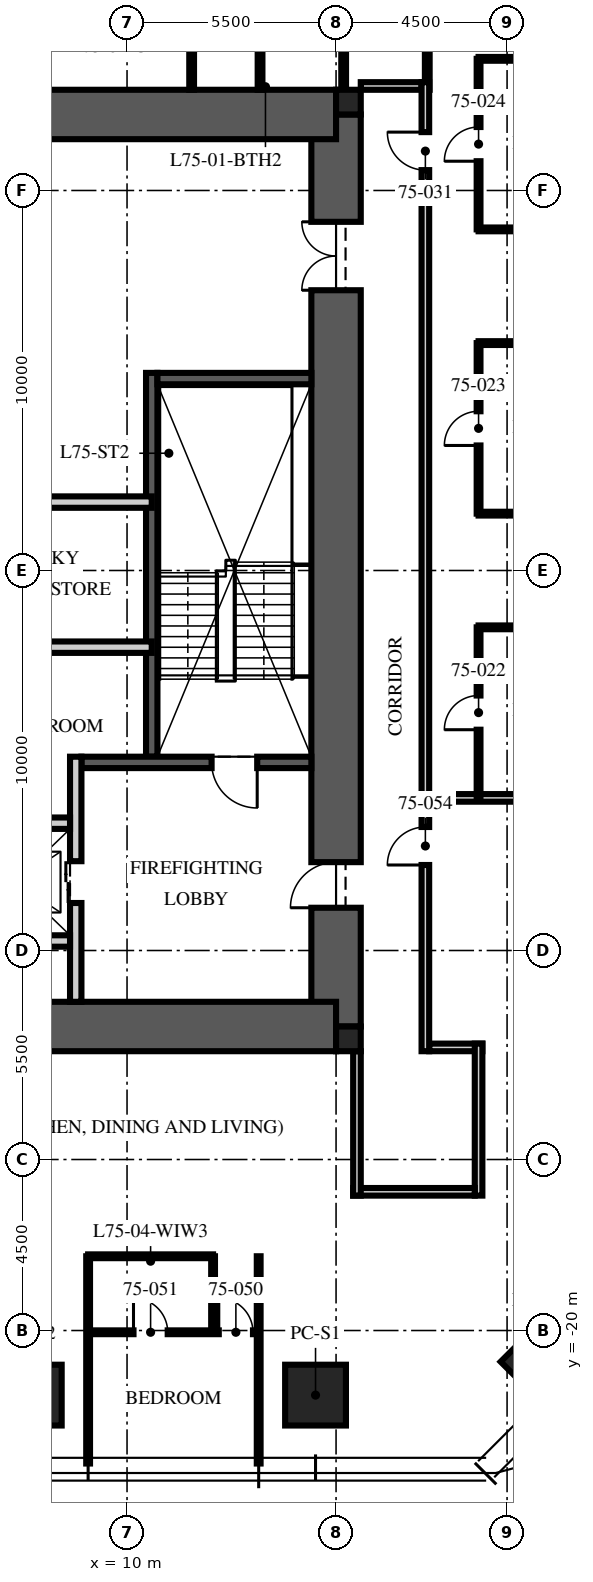
"""IFC4 building model, lengths in metres.
Left out: names, types, materials, properties, quantities, classifications, styles, units other than length and angle.
Written with IfcOpenShell. Run it as: python <this file> out.ifc"""

import sys

from ifc_helpers import new_model, si_unit, direction, frame, frame_2d, origin, origin_2d, place, context, subcontext, project, spatial, rectangle, extrude, element, fill, save


model = new_model("IFC4")
c1 = context("Model", 3, precision=1e-05, world=origin(), true_north=direction((0.0, 1.0)))
c2 = subcontext(c1, "Body", "Model", "MODEL_VIEW")
j1 = project(units=[si_unit("LENGTHUNIT", "METRE"), si_unit("PLANEANGLEUNIT", "RADIAN")], contexts=[c1])
p1 = place(None, origin())
s1 = spatial("IfcSite", under=j1, at=p1, CompositionType="ELEMENT")
p2 = place(p1, origin())
s2 = spatial("IfcBuilding", under=s1, at=p2, CompositionType="ELEMENT")
p3 = place(p2, frame((0.0, 0.0, 300.75)))
s3 = spatial("IfcBuildingStorey", under=s2, at=p3, CompositionType="ELEMENT", Elevation=300.75)
p4 = place(p3, frame((15.5, -12.0, -0.25), z_axis=(0.0, 0.0, 1.0), x_axis=(0.0, 1.0, 0.0)))
e1 = element("IfcWall", 1, at=p4, inside=s3, PredefinedType="SHEAR", context=c2, shape_type="SweptSolid", body=[
    extrude(rectangle(XDim=24.0, YDim=1.3, at=frame_2d((12.0, 0.0))), origin(), (0.0, 0.0, 1.0), 3.75),
])
p5 = place(p4, frame((3.125, 0.0, 0.25)))
e2 = element("IfcOpeningElement", 2, at=p5, cuts=e1, PredefinedType="OPENING", context=c2, shape_type="SweptSolid", body=[
    extrude(rectangle(XDim=1.2, YDim=2.1, at=frame_2d((0.6, 1.05))), frame((0.0, 0.66, 0.0), z_axis=(0.0, -1.0, 0.0), x_axis=(1.0, 0.0, 0.0)), (0.0, 0.0, 1.0), 1.32),
])
p6 = place(p4, frame((19.375, 0.0, 0.25)))
e3 = element("IfcOpeningElement", 3, at=p6, cuts=e1, PredefinedType="OPENING", context=c2, shape_type="SweptSolid", body=[
    extrude(rectangle(XDim=1.8, YDim=2.1, at=frame_2d((0.9, 1.05))), frame((0.0, 0.66, 0.0), z_axis=(0.0, -1.0, 0.0), x_axis=(1.0, 0.0, 0.0)), (0.0, 0.0, 1.0), 1.32),
])
for number, where, z_axis, x_axis in (
    (4, (-15.5, 12.0, -0.25), (0.0, 0.0, 1.0), (1.0, 0.0, 0.0)),
    (5, (-15.5, -12.0, -0.25), (0.0, 0.0, 1.0), (1.0, 0.0, 0.0)),
):
    element("IfcWall", number, at=place(p3, frame(where, z_axis=z_axis, x_axis=x_axis)), inside=s3, PredefinedType="SHEAR", context=c2, shape_type="SweptSolid", body=[
        extrude(rectangle(XDim=31.0, YDim=1.3, at=frame_2d((15.5, 0.0))), origin(), (0.0, 0.0, 1.0), 3.75),
    ])
for number, where, z_axis, x_axis in (
    (6, (15.825, 12.325, -0.25), (0.0, 0.0, 1.0), (1.0, 0.0, 0.0)),
    (7, (15.825, -12.325, -0.25), (0.0, 0.0, 1.0), (1.0, 0.0, 0.0)),
):
    element("IfcColumn", number, at=place(p3, frame(where, z_axis=z_axis, x_axis=x_axis)), inside=s3, PredefinedType="COLUMN", context=c2, shape_type="SweptSolid", body=[
        extrude(rectangle(XDim=0.65, YDim=0.65, at=origin_2d()), origin(), (0.0, 0.0, 1.0), 3.75),
    ])
for number, where, z_axis, x_axis in (
    (8, (14.96, -21.7, 0.0), (0.0, 0.0, 1.0), (1.0, 0.0, 0.0)),
    (9, (7.48, -21.7, 0.0), (0.0, 0.0, 1.0), (1.0, 0.0, 0.0)),
):
    element("IfcColumn", number, at=place(p3, frame(where, z_axis=z_axis, x_axis=x_axis)), inside=s3, PredefinedType="COLUMN", context=c2, shape_type="SweptSolid", body=[
        extrude(rectangle(XDim=1.6, YDim=1.6, at=origin_2d()), origin(), (0.0, 0.0, 1.0), 3.75),
    ])
p7 = place(p3, frame((20.821, -20.821, 0.0), z_axis=(0.0, 0.0, 1.0), x_axis=(0.707106781187, 0.707106781187, 0.0)))
e10 = element("IfcColumn", 10, at=p7, inside=s3, PredefinedType="COLUMN", context=c2, shape_type="SweptSolid", body=[
    extrude(rectangle(XDim=1.4, YDim=1.4, at=origin_2d()), origin(), (0.0, 0.0, 1.0), 3.75),
])
p8 = place(p3, frame((10.65, -4.9, 0.0), z_axis=(0.0, 0.0, 1.0), x_axis=(0.0, 1.0, 0.0)))
e11 = element("IfcWall", 11, at=p8, inside=s3, PredefinedType="SOLIDWALL", context=c2, shape_type="SweptSolid", body=[
    extrude(rectangle(XDim=10.1, YDim=0.3, at=frame_2d((5.05, 0.0))), origin(), (0.0, 0.0, 1.0), 3.5),
])
p9 = place(p3, frame((14.85, -5.05, 0.0), z_axis=(0.0, 0.0, 1.0), x_axis=(-1.0, 0.0, 0.0)))
e12 = element("IfcWall", 12, at=p9, inside=s3, PredefinedType="SOLIDWALL", context=c2, shape_type="SweptSolid", body=[
    extrude(rectangle(XDim=6.05, YDim=0.3, at=frame_2d((3.025, 0.0))), origin(), (0.0, 0.0, 1.0), 3.5),
])
p10 = place(p9, frame((1.425, 0.0, 0.0)))
e13 = element("IfcOpeningElement", 13, at=p10, cuts=e12, PredefinedType="OPENING", context=c2, shape_type="SweptSolid", body=[
    extrude(rectangle(XDim=1.2, YDim=2.1, at=frame_2d((0.6, 1.05))), frame((0.0, 0.16, 0.0), z_axis=(0.0, -1.0, 0.0), x_axis=(1.0, 0.0, 0.0)), (0.0, 0.0, 1.0), 0.32),
])
p11 = place(p3, frame((14.85, 5.05, 0.0), z_axis=(0.0, 0.0, 1.0), x_axis=(-1.0, 0.0, 0.0)))
e14 = element("IfcWall", 14, at=p11, inside=s3, PredefinedType="SOLIDWALL", context=c2, shape_type="SweptSolid", body=[
    extrude(rectangle(XDim=4.05, YDim=0.3, at=frame_2d((2.025, 0.0))), origin(), (0.0, 0.0, 1.0), 3.5),
])
p12 = place(p3, frame((8.65, -11.35, 0.0), z_axis=(0.0, 0.0, 1.0), x_axis=(0.0, 1.0, 0.0)))
e15 = element("IfcWall", 15, at=p12, inside=s3, PredefinedType="PARTITIONING", context=c2, shape_type="SweptSolid", body=[
    extrude(rectangle(XDim=6.45, YDim=0.3, at=frame_2d((3.225, 0.0))), origin(), (0.0, 0.0, 1.0), 3.5),
])
p13 = place(p12, frame((2.6, 0.0, 0.0)))
e16 = element("IfcOpeningElement", 16, at=p13, cuts=e15, PredefinedType="OPENING", context=c2, shape_type="SweptSolid", body=[
    extrude(rectangle(XDim=1.1, YDim=2.1, at=frame_2d((0.55, 1.05))), frame((0.0, 0.16, 0.0), z_axis=(0.0, -1.0, 0.0), x_axis=(1.0, 0.0, 0.0)), (0.0, 0.0, 1.0), 0.32),
])
p14 = place(p3, frame((-8.5, -6.65, 0.0), z_axis=(0.0, 0.0, 1.0), x_axis=(1.0, 0.0, 0.0)))
e17 = element("IfcWall", 17, at=p14, inside=s3, PredefinedType="PARTITIONING", context=c2, shape_type="SweptSolid", body=[
    extrude(rectangle(XDim=17.0, YDim=0.3, at=frame_2d((8.5, 0.0))), origin(), (0.0, 0.0, 1.0), 3.5),
])
p15 = place(p14, frame((7.8, 0.0, 0.0)))
e18 = element("IfcOpeningElement", 18, at=p15, cuts=e17, PredefinedType="OPENING", context=c2, shape_type="SweptSolid", body=[
    extrude(rectangle(XDim=1.3, YDim=2.4, at=frame_2d((0.65, 1.2))), frame((0.0, 0.16, 0.0), z_axis=(0.0, -1.0, 0.0), x_axis=(1.0, 0.0, 0.0)), (0.0, 0.0, 1.0), 0.32),
])
p16 = place(p14, frame((5.65, 0.0, 0.0)))
e19 = element("IfcOpeningElement", 19, at=p16, cuts=e17, PredefinedType="OPENING", context=c2, shape_type="SweptSolid", body=[
    extrude(rectangle(XDim=0.9, YDim=2.1, at=frame_2d((0.45, 1.05))), frame((0.0, 0.16, 0.0), z_axis=(0.0, -1.0, 0.0), x_axis=(1.0, 0.0, 0.0)), (0.0, 0.0, 1.0), 0.32),
])
p17 = place(p14, frame((10.4, 0.0, 0.0)))
e20 = element("IfcOpeningElement", 20, at=p17, cuts=e17, PredefinedType="OPENING", context=c2, shape_type="SweptSolid", body=[
    extrude(rectangle(XDim=0.9, YDim=2.1, at=frame_2d((0.45, 1.05))), frame((0.0, 0.16, 0.0), z_axis=(0.0, -1.0, 0.0), x_axis=(1.0, 0.0, 0.0)), (0.0, 0.0, 1.0), 0.32),
])
p18 = place(p3, frame((5.6, -9.75, 0.0), z_axis=(0.0, 0.0, 1.0), x_axis=(1.0, 0.0, 0.0)))
e21 = element("IfcWall", 21, at=p18, inside=s3, PredefinedType="PARTITIONING", context=c2, shape_type="SweptSolid", body=[
    extrude(rectangle(XDim=2.9, YDim=0.3, at=frame_2d((1.45, 0.0))), origin(), (0.0, 0.0, 1.0), 3.5),
])
p19 = place(p3, frame((-10.65, 1.8, 0.0), z_axis=(0.0, 0.0, 1.0), x_axis=(1.0, 0.0, 0.0)))
e22 = element("IfcWall", 22, at=p19, inside=s3, PredefinedType="PARTITIONING", context=c2, shape_type="SweptSolid", body=[
    extrude(rectangle(XDim=21.3, YDim=0.3, at=frame_2d((10.65, 0.0))), origin(), (0.0, 0.0, 1.0), 3.5),
])
p20 = place(p19, frame((10.05, 0.0, 0.0)))
e23 = element("IfcOpeningElement", 23, at=p20, cuts=e22, PredefinedType="OPENING", context=c2, shape_type="SweptSolid", body=[
    extrude(rectangle(XDim=1.2, YDim=2.1, at=frame_2d((0.6, 1.05))), frame((0.0, 0.16, 0.0), z_axis=(0.0, -1.0, 0.0), x_axis=(1.0, 0.0, 0.0)), (0.0, 0.0, 1.0), 0.32),
])
p21 = place(p19, frame((0.938, 0.0, 0.0)))
e24 = element("IfcOpeningElement", 24, at=p21, cuts=e22, PredefinedType="OPENING", context=c2, shape_type="SweptSolid", body=[
    extrude(rectangle(XDim=0.9, YDim=2.1, at=frame_2d((0.45, 1.05))), frame((0.0, 0.16, 0.0), z_axis=(0.0, -1.0, 0.0), x_axis=(1.0, 0.0, 0.0)), (0.0, 0.0, 1.0), 0.32),
])
p22 = place(p3, frame((10.65, -2.018, 0.0), z_axis=(0.0, 0.0, 1.0), x_axis=(-1.0, 0.0, 0.0)))
e25 = element("IfcWall", 25, at=p22, inside=s3, PredefinedType="PARTITIONING", context=c2, shape_type="SweptSolid", body=[
    extrude(rectangle(XDim=5.55, YDim=0.3, at=frame_2d((2.775, 0.0))), origin(), (0.0, 0.0, 1.0), 3.5),
])
p23 = place(p3, frame((17.95, -12.55, 0.0), z_axis=(0.0, 0.0, 1.0), x_axis=(1.0, 0.0, 0.0)))
e26 = element("IfcWall", 26, at=p23, inside=s3, PredefinedType="PARTITIONING", context=c2, shape_type="SweptSolid", body=[
    extrude(rectangle(XDim=1.4, YDim=0.2, at=frame_2d((0.7, 0.0))), origin(), (0.0, 0.0, 1.0), 3.5),
])
p24 = place(p3, frame((19.25, -12.45, 0.0), z_axis=(0.0, 0.0, 1.0), x_axis=(0.0, -1.0, 0.0)))
e27 = element("IfcWall", 27, at=p24, inside=s3, PredefinedType="PARTITIONING", context=c2, shape_type="SweptSolid", body=[
    extrude(rectangle(XDim=4.0, YDim=0.2, at=frame_2d((2.0, 0.0))), origin(), (0.0, 0.0, 1.0), 2.9),
])
p25 = place(p3, frame((19.15, -16.35, 0.0), z_axis=(0.0, 0.0, 1.0), x_axis=(-1.0, 0.0, 0.0)))
e28 = element("IfcWall", 28, at=p25, inside=s3, PredefinedType="PARTITIONING", context=c2, shape_type="SweptSolid", body=[
    extrude(rectangle(XDim=3.2, YDim=0.2, at=frame_2d((1.6, 0.0))), origin(), (0.0, 0.0, 1.0), 2.6),
])
p26 = place(p3, frame((16.05, -16.45, 0.0), z_axis=(0.0, 0.0, 1.0), x_axis=(0.0, 1.0, 0.0)))
e29 = element("IfcWall", 29, at=p26, inside=s3, PredefinedType="PARTITIONING", context=c2, shape_type="SweptSolid", body=[
    extrude(rectangle(XDim=3.8, YDim=0.2, at=frame_2d((1.9, 0.0))), origin(), (0.0, 0.0, 1.0), 2.6),
])
p27 = place(p3, frame((16.15, 12.75, 0.0), z_axis=(0.0, 0.0, 1.0), x_axis=(1.0, 0.0, 0.0)))
e30 = element("IfcWall", 30, at=p27, inside=s3, PredefinedType="PARTITIONING", context=c2, shape_type="SweptSolid", body=[
    extrude(rectangle(XDim=1.6, YDim=0.2, at=frame_2d((0.8, 0.0))), origin(), (0.0, 0.0, 1.0), 2.6),
])
p28 = place(p3, frame((17.95, -5.984, 0.0), z_axis=(0.0, 0.0, 1.0), x_axis=(1.0, 0.0, 0.0)))
e31 = element("IfcWall", 31, at=p28, inside=s3, PredefinedType="PARTITIONING", context=c2, shape_type="SweptSolid", body=[
    extrude(rectangle(XDim=5.55, YDim=0.2, at=frame_2d((2.775, 0.0))), origin(), (0.0, 0.0, 1.0), 3.01),
])
for number, where, z_axis, x_axis in (
    (32, (19.25, -1.496, 0.0), (0.0, 0.0, 1.0), (1.0, 0.0, 0.0)),
    (33, (19.25, 1.496, 0.0), (0.0, 0.0, 1.0), (1.0, 0.0, 0.0)),
    (34, (19.25, 5.984, 0.0), (0.0, 0.0, 1.0), (1.0, 0.0, 0.0)),
    (35, (19.25, 8.976, 0.0), (0.0, 0.0, 1.0), (1.0, 0.0, 0.0)),
    (36, (19.25, 13.464, 0.0), (0.0, 0.0, 1.0), (1.0, 0.0, 0.0)),
):
    element("IfcWall", number, at=place(p3, frame(where, z_axis=z_axis, x_axis=x_axis)), inside=s3, PredefinedType="PARTITIONING", context=c2, shape_type="SweptSolid", body=[
        extrude(rectangle(XDim=4.25, YDim=0.1, at=frame_2d((2.125, 0.0))), origin(), (0.0, 0.0, 1.0), 3.01),
    ])
for number, where, z_axis, x_axis in (
    (37, (8.976, -18.046, 0.0), (0.0, 0.0, 1.0), (0.0, -1.0, 0.0)),
    (38, (13.464, -18.046, 0.0), (0.0, 0.0, 1.0), (0.0, -1.0, 0.0)),
):
    element("IfcWall", number, at=place(p3, frame(where, z_axis=z_axis, x_axis=x_axis)), inside=s3, PredefinedType="PARTITIONING", context=c2, shape_type="SweptSolid", body=[
        extrude(rectangle(XDim=5.454, YDim=0.1, at=frame_2d((2.727, 0.0))), origin(), (0.0, 0.0, 1.0), 3.01),
    ])
p29 = place(p3, frame((19.25, -5.984, 0.0), z_axis=(0.0, 0.0, 1.0), x_axis=(0.0, 1.0, 0.0)))
e39 = element("IfcWall", 39, at=p29, inside=s3, PredefinedType="PARTITIONING", context=c2, shape_type="SweptSolid", body=[
    extrude(rectangle(XDim=4.488, YDim=0.1, at=frame_2d((2.244, 0.0))), origin(), (0.0, 0.0, 1.0), 2.91),
])
p30 = place(p29, frame((1.794, 0.0, 0.0)))
e40 = element("IfcOpeningElement", 40, at=p30, cuts=e39, PredefinedType="OPENING", context=c2, shape_type="SweptSolid", body=[
    extrude(rectangle(XDim=0.9, YDim=2.1, at=frame_2d((0.45, 1.05))), frame((0.0, 0.06, 0.0), z_axis=(0.0, -1.0, 0.0), x_axis=(1.0, 0.0, 0.0)), (0.0, 0.0, 1.0), 0.12),
])
p31 = place(p3, frame((19.25, 1.496, 0.0), z_axis=(0.0, 0.0, 1.0), x_axis=(0.0, 1.0, 0.0)))
e41 = element("IfcWall", 41, at=p31, inside=s3, PredefinedType="PARTITIONING", context=c2, shape_type="SweptSolid", body=[
    extrude(rectangle(XDim=4.488, YDim=0.1, at=frame_2d((2.244, 0.0))), origin(), (0.0, 0.0, 1.0), 2.91),
])
p32 = place(p31, frame((1.794, 0.0, 0.0)))
e42 = element("IfcOpeningElement", 42, at=p32, cuts=e41, PredefinedType="OPENING", context=c2, shape_type="SweptSolid", body=[
    extrude(rectangle(XDim=0.9, YDim=2.1, at=frame_2d((0.45, 1.05))), frame((0.0, 0.06, 0.0), z_axis=(0.0, -1.0, 0.0), x_axis=(1.0, 0.0, 0.0)), (0.0, 0.0, 1.0), 0.12),
])
p33 = place(p3, frame((19.25, 8.976, 0.0), z_axis=(0.0, 0.0, 1.0), x_axis=(0.0, 1.0, 0.0)))
e43 = element("IfcWall", 43, at=p33, inside=s3, PredefinedType="PARTITIONING", context=c2, shape_type="SweptSolid", body=[
    extrude(rectangle(XDim=4.488, YDim=0.1, at=frame_2d((2.244, 0.0))), origin(), (0.0, 0.0, 1.0), 2.91),
])
p34 = place(p33, frame((1.794, 0.0, 0.0)))
e44 = element("IfcOpeningElement", 44, at=p34, cuts=e43, PredefinedType="OPENING", context=c2, shape_type="SweptSolid", body=[
    extrude(rectangle(XDim=0.9, YDim=2.1, at=frame_2d((0.45, 1.05))), frame((0.0, 0.06, 0.0), z_axis=(0.0, -1.0, 0.0), x_axis=(1.0, 0.0, 0.0)), (0.0, 0.0, 1.0), 0.12),
])
for number, where, z_axis, x_axis in (
    (45, (17.9, 12.65, 0.0), (0.0, 0.0, 1.0), (0.0, 1.0, 0.0)),
    (46, (15.7, 12.65, 0.0), (0.0, 0.0, 1.0), (0.0, 1.0, 0.0)),
):
    element("IfcWall", number, at=place(p3, frame(where, z_axis=z_axis, x_axis=x_axis)), inside=s3, PredefinedType="PARTITIONING", context=c2, shape_type="SweptSolid", body=[
        extrude(rectangle(XDim=4.096, YDim=0.125, at=frame_2d((2.048, 0.0))), origin(), (0.0, 0.0, 1.0), 2.6),
    ])
for number, where, z_axis, x_axis in (
    (47, (13.5, 12.65, 0.0), (0.0, 0.0, 1.0), (0.0, 1.0, 0.0)),
    (48, (11.7, 12.65, 0.0), (0.0, 0.0, 1.0), (0.0, 1.0, 0.0)),
):
    element("IfcWall", number, at=place(p3, frame(where, z_axis=z_axis, x_axis=x_axis)), inside=s3, PredefinedType="PARTITIONING", context=c2, shape_type="SweptSolid", body=[
        extrude(rectangle(XDim=4.096, YDim=0.125, at=frame_2d((2.048, 0.0))), origin(), (0.0, 0.0, 1.0), 3.5),
    ])
p35 = place(p3, frame((8.976, -20.046, 0.0), z_axis=(0.0, 0.0, 1.0), x_axis=(1.0, 0.0, 0.0)))
e49 = element("IfcWall", 49, at=p35, inside=s3, PredefinedType="PARTITIONING", context=c2, shape_type="SweptSolid", body=[
    extrude(rectangle(XDim=4.488, YDim=0.1, at=frame_2d((2.244, 0.0))), origin(), (0.0, 0.0, 1.0), 2.91),
])
p36 = place(p35, frame((3.438, 0.0, 0.0)))
e50 = element("IfcOpeningElement", 50, at=p36, cuts=e49, PredefinedType="OPENING", context=c2, shape_type="SweptSolid", body=[
    extrude(rectangle(XDim=0.9, YDim=2.1, at=frame_2d((0.45, 1.05))), frame((0.0, 0.06, 0.0), z_axis=(0.0, -1.0, 0.0), x_axis=(1.0, 0.0, 0.0)), (0.0, 0.0, 1.0), 0.12),
])
p37 = place(p35, frame((1.194, 0.0, 0.0)))
e51 = element("IfcOpeningElement", 51, at=p37, cuts=e49, PredefinedType="OPENING", context=c2, shape_type="SweptSolid", body=[
    extrude(rectangle(XDim=0.9, YDim=2.1, at=frame_2d((0.45, 1.05))), frame((0.0, 0.06, 0.0), z_axis=(0.0, -1.0, 0.0), x_axis=(1.0, 0.0, 0.0)), (0.0, 0.0, 1.0), 0.12),
])
p38 = place(p3, frame((12.264, -18.046, 0.0), z_axis=(0.0, 0.0, 1.0), x_axis=(0.0, -1.0, 0.0)))
e52 = element("IfcWall", 52, at=p38, inside=s3, PredefinedType="PARTITIONING", context=c2, shape_type="SweptSolid", body=[
    extrude(rectangle(XDim=2.0, YDim=0.1, at=frame_2d((1.0, 0.0))), origin(), (0.0, 0.0, 1.0), 3.5),
])
p39 = place(p3, frame((8.976, -18.046, 0.0), z_axis=(0.0, 0.0, 1.0), x_axis=(1.0, 0.0, 0.0)))
e53 = element("IfcWall", 53, at=p39, inside=s3, PredefinedType="PARTITIONING", context=c2, shape_type="SweptSolid", body=[
    extrude(rectangle(XDim=3.288, YDim=0.1, at=frame_2d((1.644, 0.0))), origin(), (0.0, 0.0, 1.0), 2.91),
])
p40 = place(p3, frame((17.85, -12.65, 0.0), z_axis=(0.0, 0.0, 1.0), x_axis=(0.0, 1.0, 0.0)))
e54 = element("IfcWall", 54, at=p40, inside=s3, PredefinedType="PARTITIONING", context=c2, shape_type="SweptSolid", body=[
    extrude(rectangle(XDim=25.5, YDim=0.2, at=frame_2d((12.75, 0.0))), origin(), (0.0, 0.0, 1.0), 2.9),
])
p41 = place(p40, frame((23.186, 0.0, 0.0)))
e55 = element("IfcOpeningElement", 55, at=p41, cuts=e54, PredefinedType="OPENING", context=c2, shape_type="SweptSolid", body=[
    extrude(rectangle(XDim=1.0, YDim=2.2, at=frame_2d((0.5, 1.1))), frame((0.0, 0.11, 0.0), z_axis=(0.0, -1.0, 0.0), x_axis=(1.0, 0.0, 0.0)), (0.0, 0.0, 1.0), 0.22),
])
p42 = place(p40, frame((4.9, 0.0, 0.0)))
e56 = element("IfcOpeningElement", 56, at=p42, cuts=e54, PredefinedType="OPENING", context=c2, shape_type="SweptSolid", body=[
    extrude(rectangle(XDim=1.0, YDim=2.2, at=frame_2d((0.5, 1.1))), frame((0.0, 0.11, 0.0), z_axis=(0.0, -1.0, 0.0), x_axis=(1.0, 0.0, 0.0)), (0.0, 0.0, 1.0), 0.22),
])
p43 = place(p10, origin())
e57 = element("IfcDoor", 57, at=p43, inside=s3, OperationType="SINGLE_SWING_LEFT", PredefinedType="DOOR", context=c2, shape_type="SweptSolid", body=[
    extrude(rectangle(XDim=1.2, YDim=2.1, at=frame_2d((0.6, 1.05))), frame((0.0, 0.025, 0.0), z_axis=(0.0, -1.0, 0.0), x_axis=(1.0, 0.0, 0.0)), (0.0, 0.0, 1.0), 0.05),
])
fill(e13, e57)
p44 = place(p5, origin())
e58 = element("IfcDoor", 58, at=p44, inside=s3, OperationType="SINGLE_SWING_LEFT", PredefinedType="DOOR", context=c2, shape_type="SweptSolid", body=[
    extrude(rectangle(XDim=1.2, YDim=2.1, at=frame_2d((0.6, 1.05))), frame((0.0, 0.025, 0.0), z_axis=(0.0, -1.0, 0.0), x_axis=(1.0, 0.0, 0.0)), (0.0, 0.0, 1.0), 0.05),
])
fill(e2, e58)
p45 = place(p6, origin())
e59 = element("IfcDoor", 59, at=p45, inside=s3, OperationType="DOUBLE_DOOR_SINGLE_SWING", PredefinedType="DOOR", context=c2, shape_type="SweptSolid", body=[
    extrude(rectangle(XDim=1.8, YDim=2.1, at=frame_2d((0.9, 1.05))), frame((0.0, 0.025, 0.0), z_axis=(0.0, -1.0, 0.0), x_axis=(1.0, 0.0, 0.0)), (0.0, 0.0, 1.0), 0.05),
])
fill(e3, e59)
p46 = place(p13, origin())
e60 = element("IfcDoor", 60, at=p46, inside=s3, OperationType="DOUBLE_DOOR_SLIDING", PredefinedType="DOOR", context=c2, shape_type="SweptSolid", body=[
    extrude(rectangle(XDim=1.1, YDim=2.1, at=frame_2d((0.55, 1.05))), frame((0.0, 0.025, 0.0), z_axis=(0.0, -1.0, 0.0), x_axis=(1.0, 0.0, 0.0)), (0.0, 0.0, 1.0), 0.05),
])
fill(e16, e60)
p47 = place(p30, origin())
e61 = element("IfcDoor", 61, at=p47, inside=s3, OperationType="SINGLE_SWING_LEFT", PredefinedType="DOOR", context=c2, shape_type="SweptSolid", body=[
    extrude(rectangle(XDim=0.9, YDim=2.1, at=frame_2d((0.45, 1.05))), frame((0.0, 0.025, 0.0), z_axis=(0.0, -1.0, 0.0), x_axis=(1.0, 0.0, 0.0)), (0.0, 0.0, 1.0), 0.05),
])
fill(e40, e61)
p48 = place(p32, origin())
e62 = element("IfcDoor", 62, at=p48, inside=s3, OperationType="SINGLE_SWING_LEFT", PredefinedType="DOOR", context=c2, shape_type="SweptSolid", body=[
    extrude(rectangle(XDim=0.9, YDim=2.1, at=frame_2d((0.45, 1.05))), frame((0.0, 0.025, 0.0), z_axis=(0.0, -1.0, 0.0), x_axis=(1.0, 0.0, 0.0)), (0.0, 0.0, 1.0), 0.05),
])
fill(e42, e62)
p49 = place(p34, origin())
e63 = element("IfcDoor", 63, at=p49, inside=s3, OperationType="SINGLE_SWING_LEFT", PredefinedType="DOOR", context=c2, shape_type="SweptSolid", body=[
    extrude(rectangle(XDim=0.9, YDim=2.1, at=frame_2d((0.45, 1.05))), frame((0.0, 0.025, 0.0), z_axis=(0.0, -1.0, 0.0), x_axis=(1.0, 0.0, 0.0)), (0.0, 0.0, 1.0), 0.05),
])
fill(e44, e63)
p50 = place(p41, origin())
e64 = element("IfcDoor", 64, at=p50, inside=s3, OperationType="SINGLE_SWING_RIGHT", PredefinedType="DOOR", context=c2, shape_type="SweptSolid", body=[
    extrude(rectangle(XDim=1.0, YDim=2.2, at=frame_2d((0.5, 1.1))), frame((0.0, 0.025, 0.0), z_axis=(0.0, -1.0, 0.0), x_axis=(1.0, 0.0, 0.0)), (0.0, 0.0, 1.0), 0.05),
])
fill(e55, e64)
p51 = place(p36, origin())
e65 = element("IfcDoor", 65, at=p51, inside=s3, OperationType="SINGLE_SWING_LEFT", PredefinedType="DOOR", context=c2, shape_type="SweptSolid", body=[
    extrude(rectangle(XDim=0.9, YDim=2.1, at=frame_2d((0.45, 1.05))), frame((0.0, 0.025, 0.0), z_axis=(0.0, -1.0, 0.0), x_axis=(1.0, 0.0, 0.0)), (0.0, 0.0, 1.0), 0.05),
])
fill(e50, e65)
p52 = place(p37, origin())
e66 = element("IfcDoor", 66, at=p52, inside=s3, OperationType="SINGLE_SWING_LEFT", PredefinedType="DOOR", context=c2, shape_type="SweptSolid", body=[
    extrude(rectangle(XDim=0.9, YDim=2.1, at=frame_2d((0.45, 1.05))), frame((0.0, 0.025, 0.0), z_axis=(0.0, -1.0, 0.0), x_axis=(1.0, 0.0, 0.0)), (0.0, 0.0, 1.0), 0.05),
])
fill(e51, e66)
p53 = place(p42, origin())
e67 = element("IfcDoor", 67, at=p53, inside=s3, OperationType="SINGLE_SWING_LEFT", PredefinedType="DOOR", context=c2, shape_type="SweptSolid", body=[
    extrude(rectangle(XDim=1.0, YDim=2.2, at=frame_2d((0.5, 1.1))), frame((0.0, 0.025, 0.0), z_axis=(0.0, -1.0, 0.0), x_axis=(1.0, 0.0, 0.0)), (0.0, 0.0, 1.0), 0.05),
])
fill(e56, e67)
save(model, sys.argv[1])
